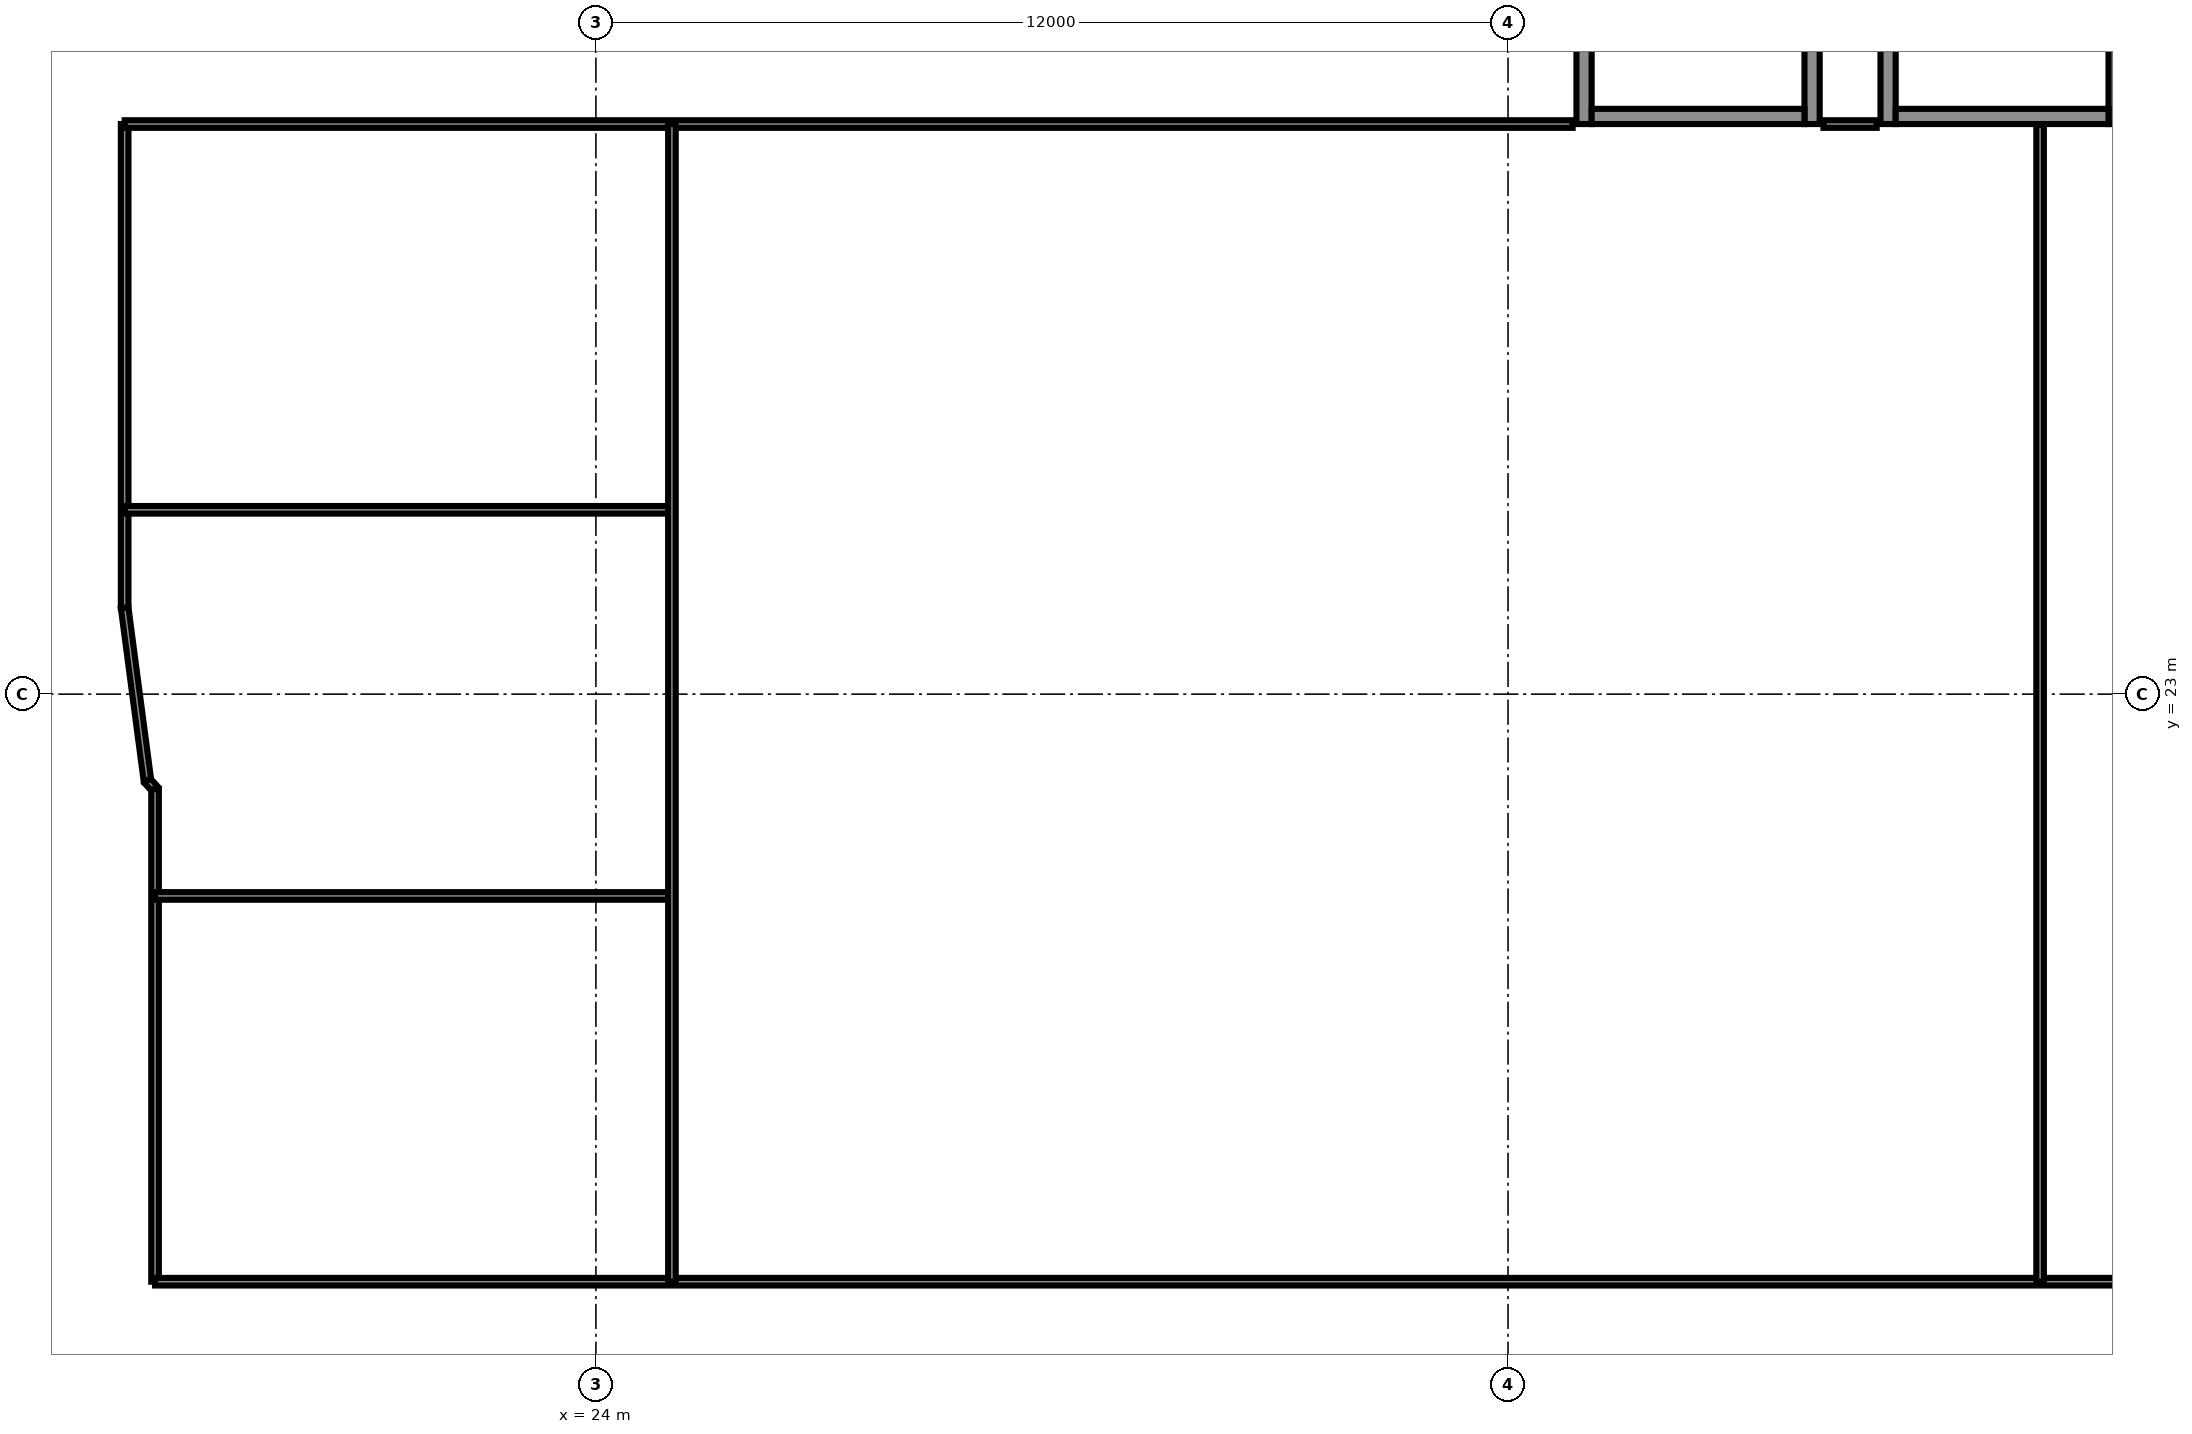
"""IFC4 building model, lengths in metres.
Left out: names, types, materials, properties, quantities, classifications, styles, units other than length and angle.
Written with IfcOpenShell. Run it as: python <this file> out.ifc"""

import sys

from ifc_helpers import new_model, si_unit, direction, frame, frame_2d, origin, origin_2d, place, context, subcontext, project, spatial, rectangle, i_section, extrude, element, fill, save


model = new_model("IFC4")
c1 = context("Model", 3, precision=1e-05, world=origin(), true_north=direction((0.0, 1.0)))
c2 = subcontext(c1, "Body", "Model", "MODEL_VIEW")
j1 = project(units=[si_unit("LENGTHUNIT", "METRE"), si_unit("PLANEANGLEUNIT", "RADIAN")], contexts=[c1])
p1 = place(None, origin())
s1 = spatial("IfcSite", under=j1, at=p1, CompositionType="ELEMENT")
p2 = place(p1, origin())
s2 = spatial("IfcBuilding", under=s1, at=p2, CompositionType="ELEMENT")
p3 = place(p2, frame((0.0, 0.0, 151.9)))
s3 = spatial("IfcBuildingStorey", under=s2, at=p3, CompositionType="ELEMENT", Elevation=151.9)
for number, where, z_axis, x_axis in (
    (1, (24.0, 23.0, 0.0), (0.0, 0.0, 1.0), (1.0, 0.0, 0.0)),
    (2, (36.0, 23.0, 0.0), (0.0, 0.0, 1.0), (1.0, 0.0, 0.0)),
):
    element("IfcColumn", number, at=place(p3, frame(where, z_axis=z_axis, x_axis=x_axis)), inside=s3, PredefinedType="COLUMN", context=c2, shape_type="SweptSolid", body=[
        extrude(i_section(OverallWidth=0.3, OverallDepth=0.5, WebThickness=0.014, FlangeThickness=0.028, FilletRadius=0.027, at=origin_2d()), origin(), (0.0, 0.0, 1.0), 3.6),
    ])
p4 = place(p3, frame((37.0, 30.5, 0.0), z_axis=(0.0, 0.0, 1.0), x_axis=(0.0, 1.0, 0.0)))
e3 = element("IfcWall", 3, at=p4, inside=s3, PredefinedType="PARTITIONING", context=c2, shape_type="SweptSolid", body=[
    extrude(rectangle(XDim=3.5, YDim=0.2, at=frame_2d((1.75, 0.0))), origin(), (0.0, 0.0, 1.0), 3.2),
])
p5 = place(p4, frame((1.2, 0.0, 0.0)))
e4 = element("IfcOpeningElement", 4, at=p5, cuts=e3, PredefinedType="OPENING", context=c2, shape_type="SweptSolid", body=[
    extrude(rectangle(XDim=1.1, YDim=2.1, at=frame_2d((0.55, 1.05))), frame((0.0, 0.11, 0.0), z_axis=(0.0, -1.0, 0.0), x_axis=(1.0, 0.0, 0.0)), (0.0, 0.0, 1.0), 0.22),
])
p6 = place(p3, frame((40.0, 30.5, 0.0), z_axis=(0.0, 0.0, 1.0), x_axis=(0.0, 1.0, 0.0)))
e5 = element("IfcWall", 5, at=p6, inside=s3, PredefinedType="PARTITIONING", context=c2, shape_type="SweptSolid", body=[
    extrude(rectangle(XDim=3.5, YDim=0.2, at=frame_2d((1.75, 0.0))), origin(), (0.0, 0.0, 1.0), 3.2),
])
p7 = place(p3, frame((37.1, 30.6, 0.0), z_axis=(0.0, 0.0, 1.0), x_axis=(1.0, 0.0, 0.0)))
e6 = element("IfcWall", 6, at=p7, inside=s3, PredefinedType="PARTITIONING", context=c2, shape_type="SweptSolid", body=[
    extrude(rectangle(XDim=2.8, YDim=0.2, at=frame_2d((1.4, 0.0))), origin(), (0.0, 0.0, 1.0), 3.2),
])
p8 = place(p3, frame((41.0, 30.5, 0.0), z_axis=(0.0, 0.0, 1.0), x_axis=(0.0, 1.0, 0.0)))
e7 = element("IfcWall", 7, at=p8, inside=s3, PredefinedType="PARTITIONING", context=c2, shape_type="SweptSolid", body=[
    extrude(rectangle(XDim=3.5, YDim=0.2, at=frame_2d((1.75, 0.0))), origin(), (0.0, 0.0, 1.0), 3.2),
])
p9 = place(p3, frame((44.0, 30.5, 0.0), z_axis=(0.0, 0.0, 1.0), x_axis=(0.0, 1.0, 0.0)))
e8 = element("IfcWall", 8, at=p9, inside=s3, PredefinedType="PARTITIONING", context=c2, shape_type="SweptSolid", body=[
    extrude(rectangle(XDim=3.5, YDim=0.2, at=frame_2d((1.75, 0.0))), origin(), (0.0, 0.0, 1.0), 3.2),
])
p10 = place(p9, frame((1.2, 0.0, 0.0)))
e9 = element("IfcOpeningElement", 9, at=p10, cuts=e8, PredefinedType="OPENING", context=c2, shape_type="SweptSolid", body=[
    extrude(rectangle(XDim=1.1, YDim=2.1, at=frame_2d((0.55, 1.05))), frame((0.0, 0.11, 0.0), z_axis=(0.0, -1.0, 0.0), x_axis=(1.0, 0.0, 0.0)), (0.0, 0.0, 1.0), 0.22),
])
p11 = place(p3, frame((41.1, 30.6, 0.0), z_axis=(0.0, 0.0, 1.0), x_axis=(1.0, 0.0, 0.0)))
e10 = element("IfcWall", 10, at=p11, inside=s3, PredefinedType="PARTITIONING", context=c2, shape_type="SweptSolid", body=[
    extrude(rectangle(XDim=2.8, YDim=0.2, at=frame_2d((1.4, 0.0))), origin(), (0.0, 0.0, 1.0), 3.2),
])
p12 = place(p3, frame((17.8, 24.135, 0.0), z_axis=(0.0, 0.0, 1.0), x_axis=(0.0, 1.0, 0.0)))
e11 = element("IfcWall", 11, at=p12, inside=s3, PredefinedType="PARTITIONING", context=c2, shape_type="SweptSolid", body=[
    extrude(rectangle(XDim=6.365, YDim=0.1, at=frame_2d((3.183, 0.0))), origin(), (0.0, 0.0, 1.0), 3.2),
])
p13 = place(p3, frame((17.8, 25.425, 0.0), z_axis=(0.0, 0.0, 1.0), x_axis=(1.0, 0.0, 0.0)))
e12 = element("IfcWall", 12, at=p13, inside=s3, PredefinedType="PARTITIONING", context=c2, shape_type="SweptSolid", body=[
    extrude(rectangle(XDim=7.2, YDim=0.1, at=frame_2d((3.6, 0.0))), origin(), (0.0, 0.0, 1.0), 3.2),
])
p14 = place(p3, frame((17.8, 30.5, 0.0), z_axis=(0.0, 0.0, 1.0), x_axis=(1.0, 0.0, 0.0)))
e13 = element("IfcWall", 13, at=p14, inside=s3, PredefinedType="PARTITIONING", context=c2, shape_type="SweptSolid", body=[
    extrude(rectangle(XDim=19.05, YDim=0.1, at=frame_2d((9.525, 0.0))), origin(), (0.0, 0.0, 1.0), 3.2),
])
p15 = place(p14, frame((0.545, 0.0, 0.0)))
e14 = element("IfcOpeningElement", 14, at=p15, cuts=e13, PredefinedType="OPENING", context=c2, shape_type="SweptSolid", body=[
    extrude(rectangle(XDim=1.0, YDim=2.1, at=frame_2d((0.5, 1.05))), frame((0.0, 0.06, 0.0), z_axis=(0.0, -1.0, 0.0), x_axis=(1.0, 0.0, 0.0)), (0.0, 0.0, 1.0), 0.12),
])
p16 = place(p14, frame((12.62, 0.0, 0.0)))
e15 = element("IfcOpeningElement", 15, at=p16, cuts=e13, PredefinedType="OPENING", context=c2, shape_type="SweptSolid", body=[
    extrude(rectangle(XDim=1.0, YDim=2.1, at=frame_2d((0.5, 1.05))), frame((0.0, 0.06, 0.0), z_axis=(0.0, -1.0, 0.0), x_axis=(1.0, 0.0, 0.0)), (0.0, 0.0, 1.0), 0.12),
])
p17 = place(p3, frame((18.1, 21.86, 0.0), z_axis=(0.0, 0.0, 1.0), x_axis=(-0.130763, 0.991415, 0.0)))
e16 = element("IfcWall", 16, at=p17, inside=s3, PredefinedType="PARTITIONING", context=c2, shape_type="SweptSolid", body=[
    extrude(rectangle(XDim=2.295, YDim=0.1, at=frame_2d((1.147, 0.0))), origin(), (0.0, 0.0, 1.0), 3.2),
])
p18 = place(p17, frame((0.546, 0.0, 0.0)))
e17 = element("IfcOpeningElement", 17, at=p18, cuts=e16, PredefinedType="OPENING", context=c2, shape_type="SweptSolid", body=[
    extrude(rectangle(XDim=1.0, YDim=2.1, at=frame_2d((0.5, 1.05))), frame((0.0, 0.06, 0.0), z_axis=(0.0, -1.0, 0.0), x_axis=(1.0, 0.0, 0.0)), (0.0, 0.0, 1.0), 0.12),
])
p19 = place(p3, frame((18.2, 21.75, 0.0), z_axis=(0.0, 0.0, 1.0), x_axis=(-0.671773, 0.740757, 0.0)))
e18 = element("IfcWall", 18, at=p19, inside=s3, PredefinedType="PARTITIONING", context=c2, shape_type="SweptSolid", body=[
    extrude(rectangle(XDim=0.149, YDim=0.1, at=frame_2d((0.074, 0.0))), origin(), (0.0, 0.0, 1.0), 3.2),
])
p20 = place(p3, frame((18.2, 15.27, 0.0), z_axis=(0.0, 0.0, 1.0), x_axis=(0.0, 1.0, 0.0)))
e19 = element("IfcWall", 19, at=p20, inside=s3, PredefinedType="PARTITIONING", context=c2, shape_type="SweptSolid", body=[
    extrude(rectangle(XDim=6.48, YDim=0.1, at=frame_2d((3.24, 0.0))), origin(), (0.0, 0.0, 1.0), 3.2),
])
p21 = place(p3, frame((18.2, 15.27, 0.0), z_axis=(0.0, 0.0, 1.0), x_axis=(1.0, 0.0, 0.0)))
e20 = element("IfcWall", 20, at=p21, inside=s3, PredefinedType="PARTITIONING", context=c2, shape_type="SweptSolid", body=[
    extrude(rectangle(XDim=62.291, YDim=0.1, at=frame_2d((31.146, 0.0))), origin(), (0.0, 0.0, 1.0), 2.58),
])
p22 = place(p21, frame((0.38, 0.0, 0.0)))
e21 = element("IfcOpeningElement", 21, at=p22, cuts=e20, PredefinedType="OPENING", context=c2, shape_type="SweptSolid", body=[
    extrude(rectangle(XDim=1.0, YDim=2.1, at=frame_2d((0.5, 1.05))), frame((0.0, 0.06, 0.0), z_axis=(0.0, -1.0, 0.0), x_axis=(1.0, 0.0, 0.0)), (0.0, 0.0, 1.0), 0.12),
])
p23 = place(p21, frame((58.102, 0.0, 0.0)))
e22 = element("IfcOpeningElement", 22, at=p23, cuts=e20, PredefinedType="OPENING", context=c2, shape_type="SweptSolid", body=[
    extrude(rectangle(XDim=1.0, YDim=2.1, at=frame_2d((0.5, 1.05))), frame((0.0, 0.06, 0.0), z_axis=(0.0, -1.0, 0.0), x_axis=(1.0, 0.0, 0.0)), (0.0, 0.0, 1.0), 0.12),
])
p24 = place(p3, frame((18.2, 20.345, 0.0), z_axis=(0.0, 0.0, 1.0), x_axis=(1.0, 0.0, 0.0)))
e23 = element("IfcWall", 23, at=p24, inside=s3, PredefinedType="PARTITIONING", context=c2, shape_type="SweptSolid", body=[
    extrude(rectangle(XDim=6.8, YDim=0.1, at=frame_2d((3.4, 0.0))), origin(), (0.0, 0.0, 1.0), 3.2),
])
p25 = place(p3, frame((25.0, 15.27, 0.0), z_axis=(0.0, 0.0, 1.0), x_axis=(0.0, 1.0, 0.0)))
e24 = element("IfcWall", 24, at=p25, inside=s3, PredefinedType="PARTITIONING", context=c2, shape_type="SweptSolid", body=[
    extrude(rectangle(XDim=15.23, YDim=0.1, at=frame_2d((7.615, 0.0))), origin(), (0.0, 0.0, 1.0), 3.2),
])
p26 = place(p3, frame((43.0, 15.27, 0.0), z_axis=(0.0, 0.0, 1.0), x_axis=(0.0, 1.0, 0.0)))
e25 = element("IfcWall", 25, at=p26, inside=s3, PredefinedType="PARTITIONING", context=c2, shape_type="SweptSolid", body=[
    extrude(rectangle(XDim=15.22, YDim=0.1, at=frame_2d((7.61, 0.0))), origin(), (0.0, 0.0, 1.0), 3.2),
])
p27 = place(p3, frame((43.0, 28.7, 0.0), z_axis=(0.0, 0.0, 1.0), x_axis=(1.0, 0.0, 0.0)))
e26 = element("IfcWall", 26, at=p27, inside=s3, PredefinedType="PARTITIONING", context=c2, shape_type="SweptSolid", body=[
    extrude(rectangle(XDim=6.0, YDim=0.1, at=frame_2d((3.0, 0.0))), origin(), (0.0, 0.0, 1.0), 3.2),
])
p28 = place(p27, frame((0.67, 0.0, 0.0)))
e27 = element("IfcOpeningElement", 27, at=p28, cuts=e26, PredefinedType="OPENING", context=c2, shape_type="SweptSolid", body=[
    extrude(rectangle(XDim=0.9, YDim=2.1, at=frame_2d((0.45, 1.05))), frame((0.0, 0.06, 0.0), z_axis=(0.0, -1.0, 0.0), x_axis=(1.0, 0.0, 0.0)), (0.0, 0.0, 1.0), 0.12),
])
p29 = place(p27, frame((2.61, 0.0, 0.0)))
e28 = element("IfcOpeningElement", 28, at=p29, cuts=e26, PredefinedType="OPENING", context=c2, shape_type="SweptSolid", body=[
    extrude(rectangle(XDim=0.9, YDim=2.1, at=frame_2d((0.45, 1.05))), frame((0.0, 0.06, 0.0), z_axis=(0.0, -1.0, 0.0), x_axis=(1.0, 0.0, 0.0)), (0.0, 0.0, 1.0), 0.12),
])
p30 = place(p27, frame((4.52, 0.0, 0.0)))
e29 = element("IfcOpeningElement", 29, at=p30, cuts=e26, PredefinedType="OPENING", context=c2, shape_type="SweptSolid", body=[
    extrude(rectangle(XDim=1.0, YDim=2.1, at=frame_2d((0.5, 1.05))), frame((0.0, 0.06, 0.0), z_axis=(0.0, -1.0, 0.0), x_axis=(1.0, 0.0, 0.0)), (0.0, 0.0, 1.0), 0.12),
])
p31 = place(p3, frame((40.15, 30.5, 0.0), z_axis=(0.0, 0.0, 1.0), x_axis=(1.0, 0.0, 0.0)))
e30 = element("IfcWall", 30, at=p31, inside=s3, PredefinedType="PARTITIONING", context=c2, shape_type="SweptSolid", body=[
    extrude(rectangle(XDim=0.7, YDim=0.1, at=frame_2d((0.35, 0.0))), origin(), (0.0, 0.0, 1.0), 3.2),
])
p32 = place(p22, origin())
e31 = element("IfcDoor", 31, at=p32, inside=s3, OperationType="SINGLE_SWING_LEFT", PredefinedType="DOOR", context=c2, shape_type="SweptSolid", body=[
    extrude(rectangle(XDim=1.0, YDim=2.1, at=frame_2d((0.5, 1.05))), frame((0.0, 0.025, 0.0), z_axis=(0.0, -1.0, 0.0), x_axis=(1.0, 0.0, 0.0)), (0.0, 0.0, 1.0), 0.05),
])
fill(e21, e31)
p33 = place(p18, origin())
e32 = element("IfcDoor", 32, at=p33, inside=s3, OperationType="SINGLE_SWING_LEFT", PredefinedType="DOOR", context=c2, shape_type="SweptSolid", body=[
    extrude(rectangle(XDim=1.0, YDim=2.1, at=frame_2d((0.5, 1.05))), frame((0.0, 0.025, 0.0), z_axis=(0.0, -1.0, 0.0), x_axis=(1.0, 0.0, 0.0)), (0.0, 0.0, 1.0), 0.05),
])
fill(e17, e32)
p34 = place(p28, origin())
e33 = element("IfcDoor", 33, at=p34, inside=s3, OperationType="SINGLE_SWING_LEFT", PredefinedType="DOOR", context=c2, shape_type="SweptSolid", body=[
    extrude(rectangle(XDim=0.9, YDim=2.1, at=frame_2d((0.45, 1.05))), frame((0.0, 0.025, 0.0), z_axis=(0.0, -1.0, 0.0), x_axis=(1.0, 0.0, 0.0)), (0.0, 0.0, 1.0), 0.05),
])
fill(e27, e33)
p35 = place(p15, origin())
e34 = element("IfcDoor", 34, at=p35, inside=s3, OperationType="SINGLE_SWING_LEFT", PredefinedType="DOOR", context=c2, shape_type="SweptSolid", body=[
    extrude(rectangle(XDim=1.0, YDim=2.1, at=frame_2d((0.5, 1.05))), frame((0.0, 0.025, 0.0), z_axis=(0.0, -1.0, 0.0), x_axis=(1.0, 0.0, 0.0)), (0.0, 0.0, 1.0), 0.05),
])
fill(e14, e34)
p36 = place(p16, origin())
e35 = element("IfcDoor", 35, at=p36, inside=s3, OperationType="SINGLE_SWING_LEFT", PredefinedType="DOOR", context=c2, shape_type="SweptSolid", body=[
    extrude(rectangle(XDim=1.0, YDim=2.1, at=frame_2d((0.5, 1.05))), frame((0.0, 0.025, 0.0), z_axis=(0.0, -1.0, 0.0), x_axis=(1.0, 0.0, 0.0)), (0.0, 0.0, 1.0), 0.05),
])
fill(e15, e35)
save(model, sys.argv[1])
